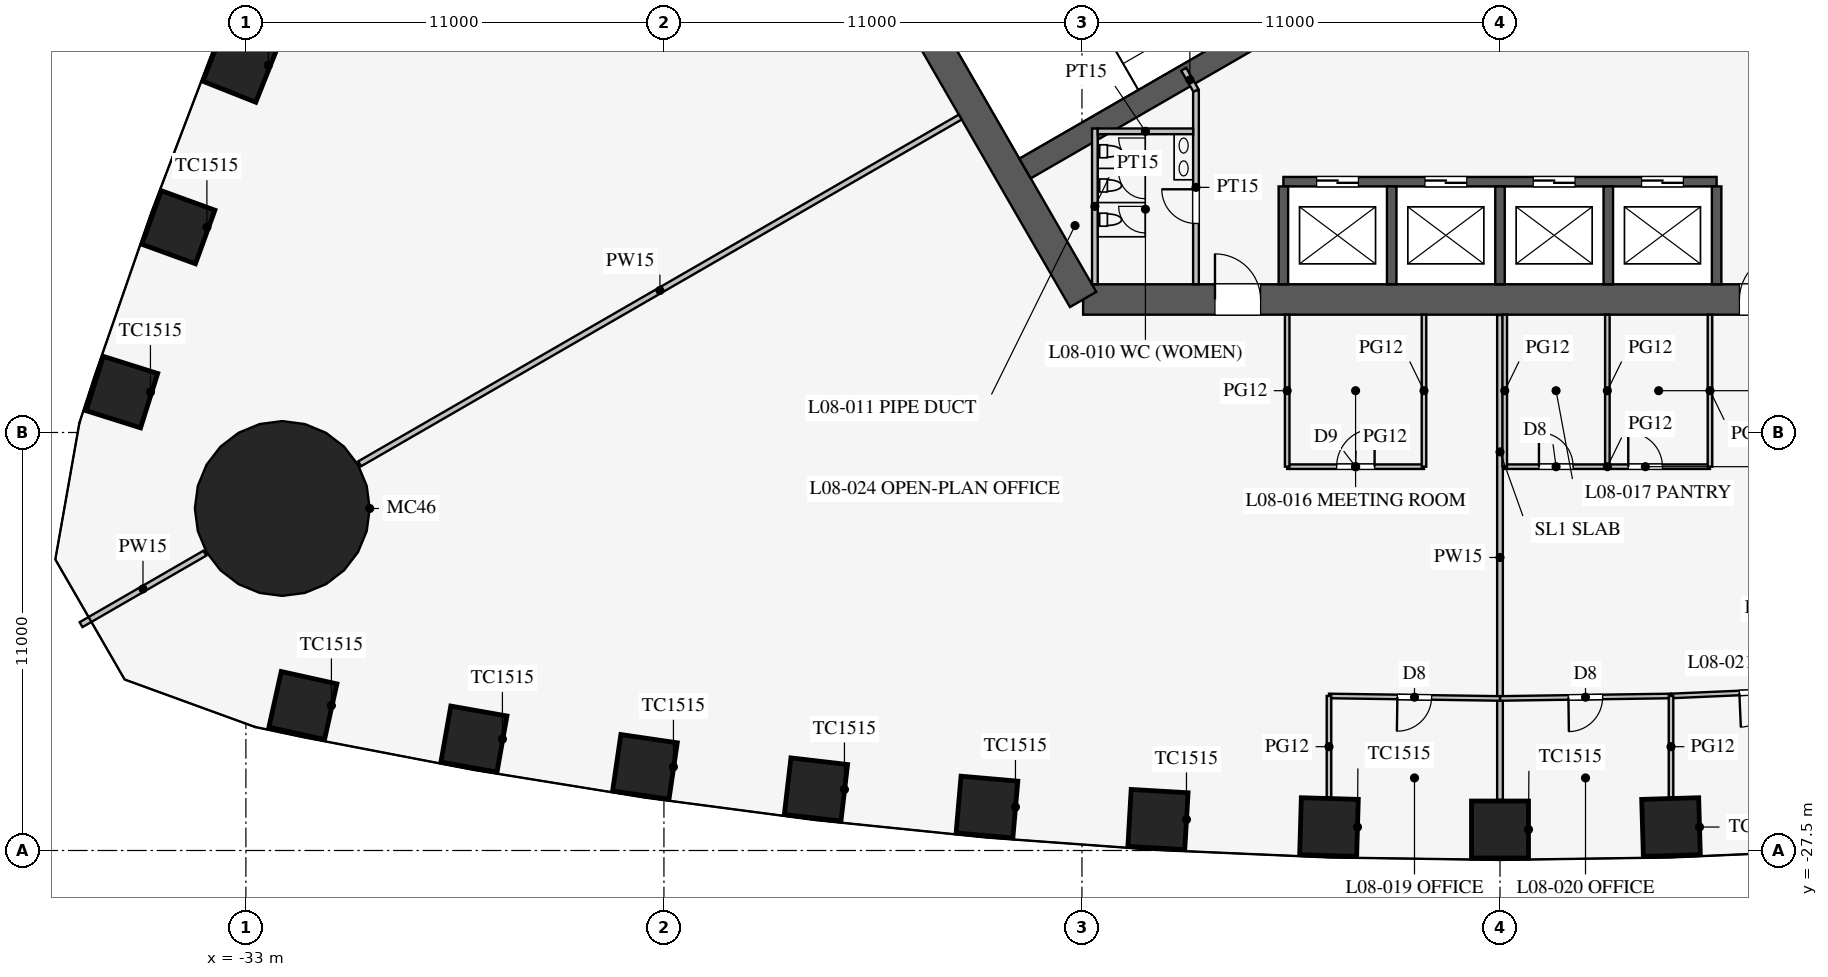
"""IFC4 building model, lengths in metres.
Left out: names, types, materials, properties, quantities, classifications, styles, units other than length and angle.
Written with IfcOpenShell. Run it as: python <this file> out.ifc"""

import sys

from ifc_helpers import new_model, si_unit, direction, frame, frame_2d, origin, origin_2d, place, context, subcontext, project, spatial, rectangle, circle, extrude, element, fill, save


model = new_model("IFC4")
c1 = context("Model", 3, precision=1e-05, world=origin(), true_north=direction((0.0, 1.0)))
c2 = subcontext(c1, "Body", "Model", "MODEL_VIEW")
j1 = project(units=[si_unit("LENGTHUNIT", "METRE"), si_unit("PLANEANGLEUNIT", "RADIAN")], contexts=[c1])
p1 = place(None, origin())
s1 = spatial("IfcSite", under=j1, at=p1, CompositionType="ELEMENT")
p2 = place(p1, origin())
s2 = spatial("IfcBuilding", under=s1, at=p2, CompositionType="ELEMENT")
p3 = place(p2, frame((0.0, 0.0, 37.5)))
s3 = spatial("IfcBuildingStorey", under=s2, at=p3, CompositionType="ELEMENT", Elevation=37.5)
for number, where, z_axis, x_axis in (
    (1, (-31.5, -23.685, 0.0), (0.0, 0.0, 1.0), (0.976, -0.217, 0.0)),
    (2, (-27.0, -24.568, 0.0), (0.0, 0.0, 1.0), (0.985, -0.174, 0.0)),
    (3, (-22.5, -25.299, 0.0), (0.0, 0.0, 1.0), (0.989, -0.145, 0.0)),
    (4, (-18.0, -25.895, 0.0), (0.0, 0.0, 1.0), (0.993, -0.116, 0.0)),
    (5, (-13.5, -26.357, 0.0), (0.0, 0.0, 1.0), (0.996, -0.087, 0.0)),
    (6, (-9.0, -26.686, 0.0), (0.0, 0.0, 1.0), (0.998, -0.058, 0.0)),
    (7, (-4.5, -26.883, 0.0), (0.0, 0.0, 1.0), (1.0, -0.029, 0.0)),
    (8, (0.0, -26.949, 0.0), (0.0, 0.0, 1.0), (1.0, 0.0, 0.0)),
    (9, (4.5, -26.883, 0.0), (0.0, 0.0, 1.0), (1.0, 0.029, 0.0)),
    (10, (-33.16, -6.836, 0.0), (0.0, 0.0, 1.0), (-0.369, -0.929, 0.0)),
    (11, (-34.776, -11.099, 0.0), (0.0, 0.0, 1.0), (-0.342, -0.94, 0.0)),
    (12, (-36.262, -15.438, 0.0), (0.0, 0.0, 1.0), (-0.3, -0.954, 0.0)),
):
    element("IfcColumn", number, at=place(p3, frame(where, z_axis=z_axis, x_axis=x_axis)), inside=s3, PredefinedType="COLUMN", context=c2, shape_type="SweptSolid", body=[
        extrude(rectangle(XDim=1.5, YDim=1.5, at=origin_2d()), origin(), (0.0, 0.0, 1.0), 4.2),
    ])
p4 = place(p3, frame((-32.043, -18.5, 0.0), z_axis=(0.0, 0.0, 1.0), x_axis=(1.0, 0.0, 0.0)))
e13 = element("IfcColumn", 13, at=p4, inside=s3, PredefinedType="COLUMN", context=c2, shape_type="SweptSolid", body=[
    extrude(circle(Radius=2.3, at=origin_2d()), origin(), (0.0, 0.0, 1.0), 4.2),
])
p5 = place(p3, frame((-10.97, -13.0, 0.0), z_axis=(0.0, 0.0, 1.0), x_axis=(1.0, 0.0, 0.0)))
e14 = element("IfcWall", 14, at=p5, inside=s3, PredefinedType="SHEAR", context=c2, shape_type="SweptSolid", body=[
    extrude(rectangle(XDim=21.939, YDim=0.8, at=frame_2d((10.97, 0.0))), origin(), (0.0, 0.0, 1.0), 4.2),
])
p6 = place(p5, frame((17.27, 0.0, 0.0)))
e15 = element("IfcOpeningElement", 15, at=p6, cuts=e14, PredefinedType="OPENING", context=c2, shape_type="SweptSolid", body=[
    extrude(rectangle(XDim=1.2, YDim=2.1, at=frame_2d((0.6, 1.05))), frame((0.0, 0.41, 0.0), z_axis=(0.0, -1.0, 0.0), x_axis=(1.0, 0.0, 0.0)), (0.0, 0.0, 1.0), 0.82),
])
p7 = place(p5, frame((3.47, 0.0, 0.0)))
e16 = element("IfcOpeningElement", 16, at=p7, cuts=e14, PredefinedType="OPENING", context=c2, shape_type="SweptSolid", body=[
    extrude(rectangle(XDim=1.2, YDim=2.1, at=frame_2d((0.6, 1.05))), frame((0.0, 0.41, 0.0), z_axis=(0.0, -1.0, 0.0), x_axis=(1.0, 0.0, 0.0)), (0.0, 0.0, 1.0), 0.82),
])
p8 = place(p3, frame((-16.743, -3.0, 0.0), z_axis=(0.0, 0.0, 1.0), x_axis=(0.499995765644, -0.866027848477, 0.0)))
e17 = element("IfcWall", 17, at=p8, inside=s3, PredefinedType="SHEAR", context=c2, shape_type="SweptSolid", body=[
    extrude(rectangle(XDim=11.547, YDim=0.8, at=frame_2d((5.773, 0.0))), origin(), (0.0, 0.0, 1.0), 4.2),
])
p9 = place(p3, frame((-5.7, -9.9, 0.0), z_axis=(0.0, 0.0, 1.0), x_axis=(1.0, 0.0, 0.0)))
e18 = element("IfcWall", 18, at=p9, inside=s3, PredefinedType="SHEAR", context=c2, shape_type="SweptSolid", body=[
    extrude(rectangle(XDim=11.4, YDim=0.25, at=frame_2d((5.7, 0.0))), origin(), (0.0, 0.0, 1.0), 4.2),
])
p10 = place(p9, frame((0.875, 0.0, 0.0)))
e19 = element("IfcOpeningElement", 19, at=p10, cuts=e18, PredefinedType="OPENING", context=c2, shape_type="SweptSolid", body=[
    extrude(rectangle(XDim=1.1, YDim=2.2, at=frame_2d((0.55, 1.1))), frame((0.0, 0.135, 0.0), z_axis=(0.0, -1.0, 0.0), x_axis=(1.0, 0.0, 0.0)), (0.0, 0.0, 1.0), 0.27),
])
p11 = place(p9, frame((3.725, 0.0, 0.0)))
e20 = element("IfcOpeningElement", 20, at=p11, cuts=e18, PredefinedType="OPENING", context=c2, shape_type="SweptSolid", body=[
    extrude(rectangle(XDim=1.1, YDim=2.2, at=frame_2d((0.55, 1.1))), frame((0.0, 0.135, 0.0), z_axis=(0.0, -1.0, 0.0), x_axis=(1.0, 0.0, 0.0)), (0.0, 0.0, 1.0), 0.27),
])
p12 = place(p9, frame((6.575, 0.0, 0.0)))
e21 = element("IfcOpeningElement", 21, at=p12, cuts=e18, PredefinedType="OPENING", context=c2, shape_type="SweptSolid", body=[
    extrude(rectangle(XDim=1.1, YDim=2.2, at=frame_2d((0.55, 1.1))), frame((0.0, 0.135, 0.0), z_axis=(0.0, -1.0, 0.0), x_axis=(1.0, 0.0, 0.0)), (0.0, 0.0, 1.0), 0.27),
])
p13 = place(p9, frame((9.425, 0.0, 0.0)))
e22 = element("IfcOpeningElement", 22, at=p13, cuts=e18, PredefinedType="OPENING", context=c2, shape_type="SweptSolid", body=[
    extrude(rectangle(XDim=1.1, YDim=2.2, at=frame_2d((0.55, 1.1))), frame((0.0, 0.135, 0.0), z_axis=(0.0, -1.0, 0.0), x_axis=(1.0, 0.0, 0.0)), (0.0, 0.0, 1.0), 0.27),
])
for number, where, z_axis, x_axis in (
    (23, (-5.7, -10.025, 0.0), (0.0, 0.0, 1.0), (0.0, -1.0, 0.0)),
    (24, (-2.85, -10.025, 0.0), (0.0, 0.0, 1.0), (0.0, -1.0, 0.0)),
    (25, (0.0, -10.025, 0.0), (0.0, 0.0, 1.0), (0.0, -1.0, 0.0)),
    (26, (2.85, -10.025, 0.0), (0.0, 0.0, 1.0), (0.0, -1.0, 0.0)),
    (27, (5.7, -10.025, 0.0), (0.0, 0.0, 1.0), (0.0, -1.0, 0.0)),
):
    element("IfcWall", number, at=place(p3, frame(where, z_axis=z_axis, x_axis=x_axis)), inside=s3, PredefinedType="SHEAR", context=c2, shape_type="SweptSolid", body=[
        extrude(rectangle(XDim=2.575, YDim=0.25, at=frame_2d((1.288, 0.0))), origin(), (0.0, 0.0, 1.0), 4.2),
    ])
for number, where, z_axis, x_axis in (
    (28, (4.638, -5.016, 0.0), (0.0, 0.0, 1.0), (0.866, -0.5, 0.0)),
    (29, (-4.638, -5.016, 0.0), (0.0, 0.0, 1.0), (-0.866, -0.5, 0.0)),
):
    element("IfcWall", number, at=place(p3, frame(where, z_axis=z_axis, x_axis=x_axis)), inside=s3, PredefinedType="SHEAR", context=c2, shape_type="SweptSolid", body=[
        extrude(rectangle(XDim=9.075, YDim=0.6, at=frame_2d((4.538, 0.0))), origin(), (0.0, 0.0, 1.0), 4.2),
    ])
p14 = place(p3, frame((-8.0, -7.5, 0.0), z_axis=(0.0, 0.0, 1.0), x_axis=(0.0, -1.0, 0.0)))
e30 = element("IfcWall", 30, at=p14, inside=s3, PredefinedType="PARTITIONING", context=c2, shape_type="SweptSolid", body=[
    extrude(rectangle(XDim=5.1, YDim=0.15, at=frame_2d((2.55, 0.0))), origin(), (0.0, 0.0, 1.0), 4.0),
])
p15 = place(p14, frame((2.6, 0.0, 0.0)))
e31 = element("IfcOpeningElement", 31, at=p15, cuts=e30, PredefinedType="OPENING", context=c2, shape_type="SweptSolid", body=[
    extrude(rectangle(XDim=0.9, YDim=2.1, at=frame_2d((0.45, 1.05))), frame((0.0, 0.085, 0.0), z_axis=(0.0, -1.0, 0.0), x_axis=(1.0, 0.0, 0.0)), (0.0, 0.0, 1.0), 0.17),
])
p16 = place(p3, frame((-8.0, -7.5, 0.0), z_axis=(0.0, 0.0, 1.0), x_axis=(-0.499842556608, 0.866116284689, 0.0)))
e32 = element("IfcWall", 32, at=p16, inside=s3, PredefinedType="PARTITIONING", context=c2, shape_type="SweptSolid", body=[
    extrude(rectangle(XDim=0.645, YDim=0.15, at=frame_2d((0.323, 0.0))), origin(), (0.0, 0.0, 1.0), 4.0),
])
p17 = place(p3, frame((-10.66, -8.5, 0.0), z_axis=(0.0, 0.0, 1.0), x_axis=(0.0, -1.0, 0.0)))
e33 = element("IfcWall", 33, at=p17, inside=s3, PredefinedType="PARTITIONING", context=c2, shape_type="SweptSolid", body=[
    extrude(rectangle(XDim=4.1, YDim=0.15, at=frame_2d((2.05, 0.0))), origin(), (0.0, 0.0, 1.0), 4.0),
])
p18 = place(p3, frame((-8.075, -8.575, 0.0), z_axis=(0.0, 0.0, 1.0), x_axis=(-1.0, 0.0, 0.0)))
e34 = element("IfcWall", 34, at=p18, inside=s3, PredefinedType="PARTITIONING", context=c2, shape_type="SweptSolid", body=[
    extrude(rectangle(XDim=2.51, YDim=0.15, at=frame_2d((1.255, 0.0))), origin(), (0.0, 0.0, 1.0), 4.0),
])
p19 = place(p3, frame((-14.203, -8.2, 0.0), z_axis=(0.0, 0.0, 1.0), x_axis=(-0.866024965723, -0.500000758745, 0.0)))
e35 = element("IfcWall", 35, at=p19, inside=s3, PredefinedType="PARTITIONING", context=c2, shape_type="SweptSolid", body=[
    extrude(rectangle(XDim=18.25, YDim=0.15, at=frame_2d((9.125, 0.0))), origin(), (0.0, 0.0, 1.0), 2.3),
])
p20 = place(p3, frame((-34.078, -19.675, 0.0), z_axis=(0.0, 0.0, 1.0), x_axis=(-0.866019247219, -0.500010663332, 0.0)))
e36 = element("IfcWall", 36, at=p20, inside=s3, PredefinedType="PARTITIONING", context=c2, shape_type="SweptSolid", body=[
    extrude(rectangle(XDim=3.764, YDim=0.15, at=frame_2d((1.882, 0.0))), origin(), (0.0, 0.0, 1.0), 2.3),
])
p21 = place(p3, frame((0.0, -13.41, 0.0), z_axis=(0.0, 0.0, 1.0), x_axis=(0.0, -1.0, 0.0)))
e37 = element("IfcWall", 37, at=p21, inside=s3, PredefinedType="PARTITIONING", context=c2, shape_type="SweptSolid", body=[
    extrude(rectangle(XDim=12.759, YDim=0.15, at=frame_2d((6.379, 0.0))), origin(), (0.0, 0.0, 1.0), 3.2),
])
p22 = place(p3, frame((0.125, -17.4, 0.0), z_axis=(0.0, 0.0, 1.0), x_axis=(1.0, 0.0, 0.0)))
e38 = element("IfcWall", 38, at=p22, inside=s3, PredefinedType="PARTITIONING", context=c2, shape_type="SweptSolid", body=[
    extrude(rectangle(XDim=2.7, YDim=0.12, at=frame_2d((1.35, 0.0))), origin(), (0.0, 0.0, 1.0), 2.9),
])
p23 = place(p22, frame((0.9, 0.0, 0.15)))
e39 = element("IfcOpeningElement", 39, at=p23, cuts=e38, PredefinedType="OPENING", context=c2, shape_type="SweptSolid", body=[
    extrude(rectangle(XDim=0.9, YDim=2.1, at=frame_2d((0.45, 1.05))), frame((0.0, 0.07, 0.0), z_axis=(0.0, -1.0, 0.0), x_axis=(1.0, 0.0, 0.0)), (0.0, 0.0, 1.0), 0.14),
])
p24 = place(p3, frame((2.825, -17.4, 0.0), z_axis=(0.0, 0.0, 1.0), x_axis=(1.0, 0.0, 0.0)))
e40 = element("IfcWall", 40, at=p24, inside=s3, PredefinedType="PARTITIONING", context=c2, shape_type="SweptSolid", body=[
    extrude(rectangle(XDim=2.7, YDim=0.12, at=frame_2d((1.35, 0.0))), origin(), (0.0, 0.0, 1.0), 2.9),
])
p25 = place(p24, frame((0.55, 0.0, 0.15)))
e41 = element("IfcOpeningElement", 41, at=p25, cuts=e40, PredefinedType="OPENING", context=c2, shape_type="SweptSolid", body=[
    extrude(rectangle(XDim=0.9, YDim=2.1, at=frame_2d((0.45, 1.05))), frame((0.0, 0.07, 0.0), z_axis=(0.0, -1.0, 0.0), x_axis=(1.0, 0.0, 0.0)), (0.0, 0.0, 1.0), 0.14),
])
p26 = place(p3, frame((-5.6, -17.4, 0.0), z_axis=(0.0, 0.0, 1.0), x_axis=(1.0, 0.0, 0.0)))
e42 = element("IfcWall", 42, at=p26, inside=s3, PredefinedType="PARTITIONING", context=c2, shape_type="SweptSolid", body=[
    extrude(rectangle(XDim=3.6, YDim=0.12, at=frame_2d((1.8, 0.0))), origin(), (0.0, 0.0, 1.0), 2.9),
])
p27 = place(p26, frame((1.3, 0.0, 0.15)))
e43 = element("IfcOpeningElement", 43, at=p27, cuts=e42, PredefinedType="OPENING", context=c2, shape_type="SweptSolid", body=[
    extrude(rectangle(XDim=1.0, YDim=2.1, at=frame_2d((0.5, 1.05))), frame((0.0, 0.07, 0.0), z_axis=(0.0, -1.0, 0.0), x_axis=(1.0, 0.0, 0.0)), (0.0, 0.0, 1.0), 0.14),
])
for number, where, z_axis, x_axis in (
    (44, (0.125, -13.4, 0.0), (0.0, 0.0, 1.0), (0.0, -1.0, 0.0)),
    (45, (2.825, -13.4, 0.0), (0.0, 0.0, 1.0), (0.0, -1.0, 0.0)),
    (46, (5.525, -13.4, 0.0), (0.0, 0.0, 1.0), (0.0, -1.0, 0.0)),
    (47, (-2.0, -13.4, 0.0), (0.0, 0.0, 1.0), (0.0, -1.0, 0.0)),
    (48, (-5.6, -13.4, 0.0), (0.0, 0.0, 1.0), (0.0, -1.0, 0.0)),
):
    element("IfcWall", number, at=place(p3, frame(where, z_axis=z_axis, x_axis=x_axis)), inside=s3, PredefinedType="PARTITIONING", context=c2, shape_type="SweptSolid", body=[
        extrude(rectangle(XDim=4.0, YDim=0.12, at=frame_2d((2.0, 0.0))), origin(), (0.0, 0.0, 1.0), 2.9),
    ])
p28 = place(p3, frame((0.0, -23.499, 0.0), z_axis=(0.0, 0.0, 1.0), x_axis=(0.999894311967, 0.014538393859, 0.0)))
e49 = element("IfcWall", 49, at=p28, inside=s3, PredefinedType="PARTITIONING", context=c2, shape_type="SweptSolid", body=[
    extrude(rectangle(XDim=4.5, YDim=0.12, at=frame_2d((2.25, 0.0))), origin(), (0.0, 0.0, 1.0), 2.9),
])
p29 = place(p28, frame((1.8, 0.0, 0.15)))
e50 = element("IfcOpeningElement", 50, at=p29, cuts=e49, PredefinedType="OPENING", context=c2, shape_type="SweptSolid", body=[
    extrude(rectangle(XDim=0.9, YDim=2.1, at=frame_2d((0.45, 1.05))), frame((0.0, 0.07, 0.0), z_axis=(0.0, -1.0, 0.0), x_axis=(1.0, 0.0, 0.0)), (0.0, 0.0, 1.0), 0.14),
])
p30 = place(p3, frame((4.5, -23.433, 0.0), z_axis=(0.0, 0.0, 1.0), x_axis=(0.999052370647, 0.043524254212, 0.0)))
e51 = element("IfcWall", 51, at=p30, inside=s3, PredefinedType="PARTITIONING", context=c2, shape_type="SweptSolid", body=[
    extrude(rectangle(XDim=4.504, YDim=0.12, at=frame_2d((2.252, 0.0))), origin(), (0.0, 0.0, 1.0), 2.9),
])
p31 = place(p30, frame((1.8, 0.0, 0.15)))
e52 = element("IfcOpeningElement", 52, at=p31, cuts=e51, PredefinedType="OPENING", context=c2, shape_type="SweptSolid", body=[
    extrude(rectangle(XDim=0.9, YDim=2.1, at=frame_2d((0.45, 1.05))), frame((0.0, 0.07, 0.0), z_axis=(0.0, -1.0, 0.0), x_axis=(1.0, 0.0, 0.0)), (0.0, 0.0, 1.0), 0.14),
])
p32 = place(p3, frame((-4.5, -23.433, 0.0), z_axis=(0.0, 0.0, 1.0), x_axis=(0.999894311967, -0.014538393859, 0.0)))
e53 = element("IfcWall", 53, at=p32, inside=s3, PredefinedType="PARTITIONING", context=c2, shape_type="SweptSolid", body=[
    extrude(rectangle(XDim=4.5, YDim=0.12, at=frame_2d((2.25, 0.0))), origin(), (0.0, 0.0, 1.0), 2.9),
])
p33 = place(p32, frame((1.8, 0.0, 0.15)))
e54 = element("IfcOpeningElement", 54, at=p33, cuts=e53, PredefinedType="OPENING", context=c2, shape_type="SweptSolid", body=[
    extrude(rectangle(XDim=0.9, YDim=2.1, at=frame_2d((0.45, 1.05))), frame((0.0, 0.07, 0.0), z_axis=(0.0, -1.0, 0.0), x_axis=(1.0, 0.0, 0.0)), (0.0, 0.0, 1.0), 0.14),
])
for number, where, z_axis, x_axis in (
    (55, (4.5, -23.433, 0.0), (0.0, 0.0, 1.0), (0.0, -1.0, 0.0)),
    (56, (-4.5, -23.433, 0.0), (0.0, 0.0, 1.0), (0.0, -1.0, 0.0)),
):
    element("IfcWall", number, at=place(p3, frame(where, z_axis=z_axis, x_axis=x_axis)), inside=s3, PredefinedType="PARTITIONING", context=c2, shape_type="SweptSolid", body=[
        extrude(rectangle(XDim=2.669, YDim=0.12, at=frame_2d((1.335, 0.0))), origin(), (0.0, 0.0, 1.0), 2.9),
    ])
p34 = place(p15, frame((0.9, 0.0, 0.0), z_axis=(0.0, 0.0, 1.0), x_axis=(-1.0, 0.0, 0.0)))
e57 = element("IfcDoor", 57, at=p34, inside=s3, OperationType="SINGLE_SWING_RIGHT", PredefinedType="DOOR", context=c2, shape_type="SweptSolid", body=[
    extrude(rectangle(XDim=0.9, YDim=2.1, at=frame_2d((0.45, 1.05))), frame((0.0, 0.025, 0.0), z_axis=(0.0, -1.0, 0.0), x_axis=(1.0, 0.0, 0.0)), (0.0, 0.0, 1.0), 0.05),
])
fill(e31, e57)
p35 = place(p6, origin())
e58 = element("IfcDoor", 58, at=p35, inside=s3, OperationType="SINGLE_SWING_RIGHT", PredefinedType="DOOR", context=c2, shape_type="SweptSolid", body=[
    extrude(rectangle(XDim=1.2, YDim=2.1, at=frame_2d((0.6, 1.05))), frame((0.0, 0.025, 0.0), z_axis=(0.0, -1.0, 0.0), x_axis=(1.0, 0.0, 0.0)), (0.0, 0.0, 1.0), 0.05),
])
fill(e15, e58)
p36 = place(p7, origin())
e59 = element("IfcDoor", 59, at=p36, inside=s3, OperationType="SINGLE_SWING_LEFT", PredefinedType="DOOR", context=c2, shape_type="SweptSolid", body=[
    extrude(rectangle(XDim=1.2, YDim=2.1, at=frame_2d((0.6, 1.05))), frame((0.0, 0.025, 0.0), z_axis=(0.0, -1.0, 0.0), x_axis=(1.0, 0.0, 0.0)), (0.0, 0.0, 1.0), 0.05),
])
fill(e16, e59)
p37 = place(p27, origin())
e60 = element("IfcDoor", 60, at=p37, inside=s3, OperationType="SINGLE_SWING_RIGHT", PredefinedType="DOOR", context=c2, shape_type="SweptSolid", body=[
    extrude(rectangle(XDim=1.0, YDim=2.1, at=frame_2d((0.5, 1.05))), frame((0.0, 0.025, 0.0), z_axis=(0.0, -1.0, 0.0), x_axis=(1.0, 0.0, 0.0)), (0.0, 0.0, 1.0), 0.05),
])
fill(e43, e60)
p38 = place(p23, origin())
e61 = element("IfcDoor", 61, at=p38, inside=s3, OperationType="SINGLE_SWING_LEFT", PredefinedType="DOOR", context=c2, shape_type="SweptSolid", body=[
    extrude(rectangle(XDim=0.9, YDim=2.1, at=frame_2d((0.45, 1.05))), frame((0.0, 0.025, 0.0), z_axis=(0.0, -1.0, 0.0), x_axis=(1.0, 0.0, 0.0)), (0.0, 0.0, 1.0), 0.05),
])
fill(e39, e61)
p39 = place(p25, origin())
e62 = element("IfcDoor", 62, at=p39, inside=s3, OperationType="SINGLE_SWING_LEFT", PredefinedType="DOOR", context=c2, shape_type="SweptSolid", body=[
    extrude(rectangle(XDim=0.9, YDim=2.1, at=frame_2d((0.45, 1.05))), frame((0.0, 0.025, 0.0), z_axis=(0.0, -1.0, 0.0), x_axis=(1.0, 0.0, 0.0)), (0.0, 0.0, 1.0), 0.05),
])
fill(e41, e62)
p40 = place(p33, frame((0.9, 0.0, 0.0), z_axis=(0.0, 0.0, 1.0), x_axis=(-1.0, 0.0, 0.0)))
e63 = element("IfcDoor", 63, at=p40, inside=s3, OperationType="SINGLE_SWING_RIGHT", PredefinedType="DOOR", context=c2, shape_type="SweptSolid", body=[
    extrude(rectangle(XDim=0.9, YDim=2.1, at=frame_2d((0.45, 1.05))), frame((0.0, 0.025, 0.0), z_axis=(0.0, -1.0, 0.0), x_axis=(1.0, 0.0, 0.0)), (0.0, 0.0, 1.0), 0.05),
])
fill(e54, e63)
p41 = place(p29, frame((0.9, 0.0, 0.0), z_axis=(0.0, 0.0, 1.0), x_axis=(-1.0, 0.0, 0.0)))
e64 = element("IfcDoor", 64, at=p41, inside=s3, OperationType="SINGLE_SWING_RIGHT", PredefinedType="DOOR", context=c2, shape_type="SweptSolid", body=[
    extrude(rectangle(XDim=0.9, YDim=2.1, at=frame_2d((0.45, 1.05))), frame((0.0, 0.025, 0.0), z_axis=(0.0, -1.0, 0.0), x_axis=(1.0, 0.0, 0.0)), (0.0, 0.0, 1.0), 0.05),
])
fill(e50, e64)
p42 = place(p31, frame((0.9, 0.0, 0.0), z_axis=(0.0, 0.0, 1.0), x_axis=(-1.0, 0.0, 0.0)))
e65 = element("IfcDoor", 65, at=p42, inside=s3, OperationType="SINGLE_SWING_RIGHT", PredefinedType="DOOR", context=c2, shape_type="SweptSolid", body=[
    extrude(rectangle(XDim=0.9, YDim=2.1, at=frame_2d((0.45, 1.05))), frame((0.0, 0.025, 0.0), z_axis=(0.0, -1.0, 0.0), x_axis=(1.0, 0.0, 0.0)), (0.0, 0.0, 1.0), 0.05),
])
fill(e52, e65)
p43 = place(p10, origin())
e66 = element("IfcDoor", 66, at=p43, inside=s3, OperationType="DOUBLE_DOOR_SLIDING", PredefinedType="DOOR", context=c2, shape_type="SweptSolid", body=[
    extrude(rectangle(XDim=1.1, YDim=2.2, at=frame_2d((0.55, 1.1))), frame((0.0, 0.025, 0.0), z_axis=(0.0, -1.0, 0.0), x_axis=(1.0, 0.0, 0.0)), (0.0, 0.0, 1.0), 0.05),
])
fill(e19, e66)
p44 = place(p11, origin())
e67 = element("IfcDoor", 67, at=p44, inside=s3, OperationType="DOUBLE_DOOR_SLIDING", PredefinedType="DOOR", context=c2, shape_type="SweptSolid", body=[
    extrude(rectangle(XDim=1.1, YDim=2.2, at=frame_2d((0.55, 1.1))), frame((0.0, 0.025, 0.0), z_axis=(0.0, -1.0, 0.0), x_axis=(1.0, 0.0, 0.0)), (0.0, 0.0, 1.0), 0.05),
])
fill(e20, e67)
p45 = place(p12, origin())
e68 = element("IfcDoor", 68, at=p45, inside=s3, OperationType="DOUBLE_DOOR_SLIDING", PredefinedType="DOOR", context=c2, shape_type="SweptSolid", body=[
    extrude(rectangle(XDim=1.1, YDim=2.2, at=frame_2d((0.55, 1.1))), frame((0.0, 0.025, 0.0), z_axis=(0.0, -1.0, 0.0), x_axis=(1.0, 0.0, 0.0)), (0.0, 0.0, 1.0), 0.05),
])
fill(e21, e68)
p46 = place(p13, origin())
e69 = element("IfcDoor", 69, at=p46, inside=s3, OperationType="DOUBLE_DOOR_SLIDING", PredefinedType="DOOR", context=c2, shape_type="SweptSolid", body=[
    extrude(rectangle(XDim=1.1, YDim=2.2, at=frame_2d((0.55, 1.1))), frame((0.0, 0.025, 0.0), z_axis=(0.0, -1.0, 0.0), x_axis=(1.0, 0.0, 0.0)), (0.0, 0.0, 1.0), 0.05),
])
fill(e22, e69)
save(model, sys.argv[1])
